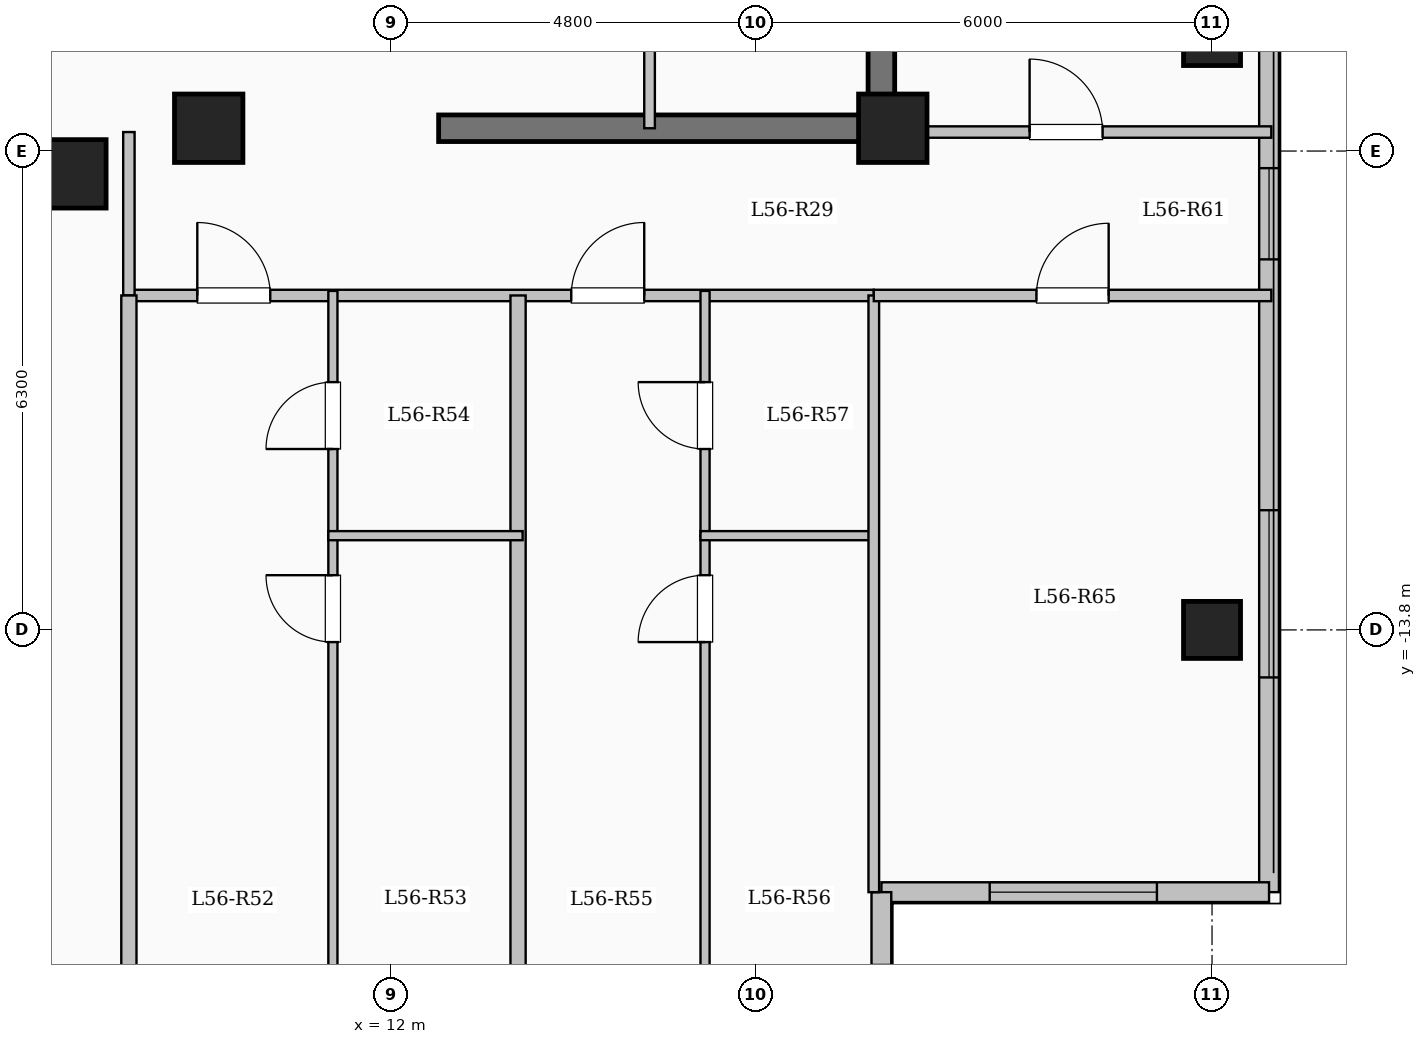
"""IFC4 building model, lengths in metres.
Left out: names, types, materials, properties, quantities, classifications, styles, units other than length and angle.
Written with IfcOpenShell. Run it as: python <this file> out.ifc"""

import sys

from ifc_helpers import new_model, si_unit, direction, frame, frame_2d, origin, origin_2d, place, context, subcontext, project, spatial, rectangle, extrude, element, fill, save


model = new_model("IFC4")
c1 = context("Model", 3, precision=1e-05, world=origin(), true_north=direction((0.0, 1.0)))
c2 = subcontext(c1, "Body", "Model", "MODEL_VIEW")
j1 = project(units=[si_unit("LENGTHUNIT", "METRE"), si_unit("PLANEANGLEUNIT", "RADIAN")], contexts=[c1])
p1 = place(None, origin())
s1 = spatial("IfcSite", under=j1, at=p1, CompositionType="ELEMENT")
p2 = place(p1, origin())
s2 = spatial("IfcBuilding", under=s1, at=p2, CompositionType="ELEMENT")
p3 = place(p2, frame((0.0, 0.0, 207.0)))
s3 = spatial("IfcBuildingStorey", under=s2, at=p3, CompositionType="ELEMENT", Elevation=207.0)
for number, where, z_axis, x_axis in (
    (1, (7.8, -7.8, 0.0), (0.0, 0.0, 1.0), (1.0, 0.0, 0.0)),
    (2, (9.6, -7.2, 0.0), (0.0, 0.0, 1.0), (1.0, 0.0, 0.0)),
    (3, (18.6, -7.2, 0.0), (0.0, 0.0, 1.0), (1.0, 0.0, 0.0)),
):
    element("IfcColumn", number, at=place(p3, frame(where, z_axis=z_axis, x_axis=x_axis)), inside=s3, PredefinedType="COLUMN", context=c2, shape_type="SweptSolid", body=[
        extrude(rectangle(XDim=0.9, YDim=0.9, at=origin_2d()), origin(), (0.0, 0.0, 1.0), 3.35),
    ])
for number, where, z_axis, x_axis in (
    (4, (22.8, -13.8, 0.0), (0.0, 0.0, 1.0), (1.0, 0.0, 0.0)),
    (5, (22.8, -6.0, 0.0), (0.0, 0.0, 1.0), (1.0, 0.0, 0.0)),
):
    element("IfcColumn", number, at=place(p3, frame(where, z_axis=z_axis, x_axis=x_axis)), inside=s3, PredefinedType="COLUMN", context=c2, shape_type="SweptSolid", body=[
        extrude(rectangle(XDim=0.75, YDim=0.75, at=origin_2d()), origin(), (0.0, 0.0, 1.0), 3.35),
    ])
p4 = place(p3, frame((23.55, 17.25, 0.0), z_axis=(0.0, 0.0, 1.0), x_axis=(0.0, -1.0, 0.0)))
e6 = element("IfcWall", 6, at=p4, inside=s3, PredefinedType="SOLIDWALL", context=c2, shape_type="SweptSolid", body=[
    extrude(rectangle(XDim=34.5, YDim=0.26, at=frame_2d((17.25, 0.0))), origin(), (0.0, 0.0, 1.0), 3.1),
])
p5 = place(p4, frame((1.375, 0.0, 0.9)))
e7 = element("IfcOpeningElement", 7, at=p5, cuts=e6, PredefinedType="OPENING", context=c2, shape_type="SweptSolid", body=[
    extrude(rectangle(XDim=2.0, YDim=1.7, at=frame_2d((1.0, 0.85))), frame((0.0, 0.14, 0.0), z_axis=(0.0, -1.0, 0.0), x_axis=(1.0, 0.0, 0.0)), (0.0, 0.0, 1.0), 0.28),
])
p6 = place(p4, frame((5.125, 0.0, 0.95)))
e8 = element("IfcOpeningElement", 8, at=p6, cuts=e6, PredefinedType="OPENING", context=c2, shape_type="SweptSolid", body=[
    extrude(rectangle(XDim=1.0, YDim=1.5, at=frame_2d((0.5, 0.75))), frame((0.0, 0.14, 0.0), z_axis=(0.0, -1.0, 0.0), x_axis=(1.0, 0.0, 0.0)), (0.0, 0.0, 1.0), 0.28),
])
p7 = place(p4, frame((8.375, 0.0, 0.9)))
e9 = element("IfcOpeningElement", 9, at=p7, cuts=e6, PredefinedType="OPENING", context=c2, shape_type="SweptSolid", body=[
    extrude(rectangle(XDim=2.0, YDim=1.7, at=frame_2d((1.0, 0.85))), frame((0.0, 0.14, 0.0), z_axis=(0.0, -1.0, 0.0), x_axis=(1.0, 0.0, 0.0)), (0.0, 0.0, 1.0), 0.28),
])
p8 = place(p4, frame((13.2, 0.0, 0.9)))
e10 = element("IfcOpeningElement", 10, at=p8, cuts=e6, PredefinedType="OPENING", context=c2, shape_type="SweptSolid", body=[
    extrude(rectangle(XDim=1.65, YDim=1.6, at=frame_2d((0.825, 0.8))), frame((0.0, 0.14, 0.0), z_axis=(0.0, -1.0, 0.0), x_axis=(1.0, 0.0, 0.0)), (0.0, 0.0, 1.0), 0.28),
])
p9 = place(p4, frame((19.05, 0.0, 0.9)))
e11 = element("IfcOpeningElement", 11, at=p9, cuts=e6, PredefinedType="OPENING", context=c2, shape_type="SweptSolid", body=[
    extrude(rectangle(XDim=2.2, YDim=1.75, at=frame_2d((1.1, 0.875))), frame((0.0, 0.14, 0.0), z_axis=(0.0, -1.0, 0.0), x_axis=(1.0, 0.0, 0.0)), (0.0, 0.0, 1.0), 0.28),
])
p10 = place(p4, frame((24.975, 0.0, 0.95)))
e12 = element("IfcOpeningElement", 12, at=p10, cuts=e6, PredefinedType="OPENING", context=c2, shape_type="SweptSolid", body=[
    extrude(rectangle(XDim=1.2, YDim=1.5, at=frame_2d((0.6, 0.75))), frame((0.0, 0.14, 0.0), z_axis=(0.0, -1.0, 0.0), x_axis=(1.0, 0.0, 0.0)), (0.0, 0.0, 1.0), 0.28),
])
p11 = place(p4, frame((29.475, 0.0, 0.9)))
e13 = element("IfcOpeningElement", 13, at=p11, cuts=e6, PredefinedType="OPENING", context=c2, shape_type="SweptSolid", body=[
    extrude(rectangle(XDim=2.2, YDim=1.75, at=frame_2d((1.1, 0.875))), frame((0.0, 0.14, 0.0), z_axis=(0.0, -1.0, 0.0), x_axis=(1.0, 0.0, 0.0)), (0.0, 0.0, 1.0), 0.28),
])
p12 = place(p3, frame((23.55, -17.25, 0.0), z_axis=(0.0, 0.0, 1.0), x_axis=(-1.0, 0.0, 0.0)))
e14 = element("IfcWall", 14, at=p12, inside=s3, PredefinedType="SOLIDWALL", context=c2, shape_type="SweptSolid", body=[
    extrude(rectangle(XDim=5.1, YDim=0.26, at=frame_2d((2.55, 0.0))), origin(), (0.0, 0.0, 1.0), 3.1),
])
p13 = place(p12, frame((1.475, 0.0, 0.9)))
e15 = element("IfcOpeningElement", 15, at=p13, cuts=e14, PredefinedType="OPENING", context=c2, shape_type="SweptSolid", body=[
    extrude(rectangle(XDim=2.2, YDim=1.75, at=frame_2d((1.1, 0.875))), frame((0.0, 0.14, 0.0), z_axis=(0.0, -1.0, 0.0), x_axis=(1.0, 0.0, 0.0)), (0.0, 0.0, 1.0), 0.28),
])
p14 = place(p3, frame((18.45, -17.25, 0.0), z_axis=(0.0, 0.0, 1.0), x_axis=(0.0, -1.0, 0.0)))
e16 = element("IfcWall", 16, at=p14, inside=s3, PredefinedType="SOLIDWALL", context=c2, shape_type="SweptSolid", body=[
    extrude(rectangle(XDim=3.6, YDim=0.26, at=frame_2d((1.8, 0.0))), origin(), (0.0, 0.0, 1.0), 3.1),
])
p15 = place(p14, frame((0.958, 0.0, 0.9)))
e17 = element("IfcOpeningElement", 17, at=p15, cuts=e16, PredefinedType="OPENING", context=c2, shape_type="SweptSolid", body=[
    extrude(rectangle(XDim=1.65, YDim=1.6, at=frame_2d((0.825, 0.8))), frame((0.0, 0.14, 0.0), z_axis=(0.0, -1.0, 0.0), x_axis=(1.0, 0.0, 0.0)), (0.0, 0.0, 1.0), 0.28),
])
p16 = place(p3, frame((18.45, -7.375, 0.0), z_axis=(0.0, 0.0, 1.0), x_axis=(0.0, 1.0, 0.0)))
e18 = element("IfcWall", 18, at=p16, inside=s3, PredefinedType="SHEAR", context=c2, shape_type="SweptSolid", body=[
    extrude(rectangle(XDim=14.05, YDim=0.35, at=frame_2d((7.025, 0.0))), origin(), (0.0, 0.0, 1.0), 3.35),
])
p17 = place(p3, frame((12.625, -7.2, 0.0), z_axis=(0.0, 0.0, 1.0), x_axis=(1.0, 0.0, 0.0)))
e19 = element("IfcWall", 19, at=p17, inside=s3, PredefinedType="SHEAR", context=c2, shape_type="SweptSolid", body=[
    extrude(rectangle(XDim=6.0, YDim=0.35, at=frame_2d((3.0, 0.0))), origin(), (0.0, 0.0, 1.0), 3.35),
])
p18 = place(p3, frame((15.4, -7.2, 0.0), z_axis=(0.0, 0.0, 1.0), x_axis=(0.0, 1.0, 0.0)))
e20 = element("IfcWall", 20, at=p18, inside=s3, PredefinedType="PARTITIONING", context=c2, shape_type="SweptSolid", body=[
    extrude(rectangle(XDim=10.45, YDim=0.14, at=frame_2d((5.225, 0.0))), origin(), (0.0, 0.0, 1.0), 3.1),
])
p19 = place(p18, frame((9.25, 0.0, 0.0)))
e21 = element("IfcOpeningElement", 21, at=p19, cuts=e20, PredefinedType="OPENING", context=c2, shape_type="SweptSolid", body=[
    extrude(rectangle(XDim=0.9, YDim=2.08, at=frame_2d((0.45, 1.04))), frame((0.0, 0.08, 0.0), z_axis=(0.0, -1.0, 0.0), x_axis=(1.0, 0.0, 0.0)), (0.0, 0.0, 1.0), 0.16),
])
p20 = place(p3, frame((8.55, -9.4, 0.0), z_axis=(0.0, 0.0, 1.0), x_axis=(1.0, 0.0, 0.0)))
e22 = element("IfcWall", 22, at=p20, inside=s3, PredefinedType="PARTITIONING", context=c2, shape_type="SweptSolid", body=[
    extrude(rectangle(XDim=9.8, YDim=0.15, at=frame_2d((4.9, 0.0))), origin(), (0.0, 0.0, 1.0), 3.1),
])
p21 = place(p20, frame((0.9, 0.0, 0.0)))
e23 = element("IfcOpeningElement", 23, at=p21, cuts=e22, PredefinedType="OPENING", context=c2, shape_type="SweptSolid", body=[
    extrude(rectangle(XDim=0.96, YDim=2.15, at=frame_2d((0.48, 1.075))), frame((0.0, 0.085, 0.0), z_axis=(0.0, -1.0, 0.0), x_axis=(1.0, 0.0, 0.0)), (0.0, 0.0, 1.0), 0.17),
])
p22 = place(p20, frame((5.82, 0.0, 0.0)))
e24 = element("IfcOpeningElement", 24, at=p22, cuts=e22, PredefinedType="OPENING", context=c2, shape_type="SweptSolid", body=[
    extrude(rectangle(XDim=0.96, YDim=2.15, at=frame_2d((0.48, 1.075))), frame((0.0, 0.085, 0.0), z_axis=(0.0, -1.0, 0.0), x_axis=(1.0, 0.0, 0.0)), (0.0, 0.0, 1.0), 0.17),
])
p23 = place(p3, frame((8.55, -9.4, 0.0), z_axis=(0.0, 0.0, 1.0), x_axis=(0.0, 1.0, 0.0)))
e25 = element("IfcWall", 25, at=p23, inside=s3, PredefinedType="PARTITIONING", context=c2, shape_type="SweptSolid", body=[
    extrude(rectangle(XDim=2.15, YDim=0.15, at=frame_2d((1.075, 0.0))), origin(), (0.0, 0.0, 1.0), 3.1),
])
p24 = place(p3, frame((13.67, -20.9, 0.0), z_axis=(0.0, 0.0, 1.0), x_axis=(0.0, 1.0, 0.0)))
e26 = element("IfcWall", 26, at=p24, inside=s3, PredefinedType="SOLIDWALL", context=c2, shape_type="SweptSolid", body=[
    extrude(rectangle(XDim=11.5, YDim=0.2, at=frame_2d((5.75, 0.0))), origin(), (0.0, 0.0, 1.0), 3.1),
])
p25 = place(p3, frame((11.234, -20.9, 0.0), z_axis=(0.0, 0.0, 1.0), x_axis=(0.0, 1.0, 0.0)))
e27 = element("IfcWall", 27, at=p25, inside=s3, PredefinedType="PARTITIONING", context=c2, shape_type="SweptSolid", body=[
    extrude(rectangle(XDim=8.34, YDim=0.12, at=frame_2d((4.17, 0.0))), origin(), (0.0, 0.0, 1.0), 3.1),
])
p26 = place(p25, frame((6.94, 0.0, 0.0)))
e28 = element("IfcOpeningElement", 28, at=p26, cuts=e27, PredefinedType="OPENING", context=c2, shape_type="SweptSolid", body=[
    extrude(rectangle(XDim=0.88, YDim=2.1, at=frame_2d((0.44, 1.05))), frame((0.0, 0.07, 0.0), z_axis=(0.0, -1.0, 0.0), x_axis=(1.0, 0.0, 0.0)), (0.0, 0.0, 1.0), 0.14),
])
p27 = place(p3, frame((11.234, -12.56, 0.0), z_axis=(0.0, 0.0, 1.0), x_axis=(0.0, 1.0, 0.0)))
e29 = element("IfcWall", 29, at=p27, inside=s3, PredefinedType="PARTITIONING", context=c2, shape_type="SweptSolid", body=[
    extrude(rectangle(XDim=3.22, YDim=0.12, at=frame_2d((1.61, 0.0))), origin(), (0.0, 0.0, 1.0), 3.1),
])
p28 = place(p27, frame((1.14, 0.0, 0.0)))
e30 = element("IfcOpeningElement", 30, at=p28, cuts=e29, PredefinedType="OPENING", context=c2, shape_type="SweptSolid", body=[
    extrude(rectangle(XDim=0.88, YDim=2.1, at=frame_2d((0.44, 1.05))), frame((0.0, 0.07, 0.0), z_axis=(0.0, -1.0, 0.0), x_axis=(1.0, 0.0, 0.0)), (0.0, 0.0, 1.0), 0.14),
])
p29 = place(p3, frame((11.174, -12.56, 0.0), z_axis=(0.0, 0.0, 1.0), x_axis=(1.0, 0.0, 0.0)))
e31 = element("IfcWall", 31, at=p29, inside=s3, PredefinedType="PARTITIONING", context=c2, shape_type="SweptSolid", body=[
    extrude(rectangle(XDim=2.556, YDim=0.12, at=frame_2d((1.278, 0.0))), origin(), (0.0, 0.0, 1.0), 2.725),
])
p30 = place(p3, frame((16.13, -20.9, 0.0), z_axis=(0.0, 0.0, 1.0), x_axis=(0.0, 1.0, 0.0)))
e32 = element("IfcWall", 32, at=p30, inside=s3, PredefinedType="PARTITIONING", context=c2, shape_type="SweptSolid", body=[
    extrude(rectangle(XDim=8.34, YDim=0.12, at=frame_2d((4.17, 0.0))), origin(), (0.0, 0.0, 1.0), 3.1),
])
p31 = place(p30, frame((6.94, 0.0, 0.0)))
e33 = element("IfcOpeningElement", 33, at=p31, cuts=e32, PredefinedType="OPENING", context=c2, shape_type="SweptSolid", body=[
    extrude(rectangle(XDim=0.88, YDim=2.1, at=frame_2d((0.44, 1.05))), frame((0.0, 0.07, 0.0), z_axis=(0.0, -1.0, 0.0), x_axis=(1.0, 0.0, 0.0)), (0.0, 0.0, 1.0), 0.14),
])
p32 = place(p3, frame((16.13, -12.56, 0.0), z_axis=(0.0, 0.0, 1.0), x_axis=(0.0, 1.0, 0.0)))
e34 = element("IfcWall", 34, at=p32, inside=s3, PredefinedType="PARTITIONING", context=c2, shape_type="SweptSolid", body=[
    extrude(rectangle(XDim=3.22, YDim=0.12, at=frame_2d((1.61, 0.0))), origin(), (0.0, 0.0, 1.0), 3.1),
])
p33 = place(p32, frame((1.14, 0.0, 0.0)))
e35 = element("IfcOpeningElement", 35, at=p33, cuts=e34, PredefinedType="OPENING", context=c2, shape_type="SweptSolid", body=[
    extrude(rectangle(XDim=0.88, YDim=2.1, at=frame_2d((0.44, 1.05))), frame((0.0, 0.07, 0.0), z_axis=(0.0, -1.0, 0.0), x_axis=(1.0, 0.0, 0.0)), (0.0, 0.0, 1.0), 0.14),
])
p34 = place(p3, frame((16.07, -12.56, 0.0), z_axis=(0.0, 0.0, 1.0), x_axis=(1.0, 0.0, 0.0)))
e36 = element("IfcWall", 36, at=p34, inside=s3, PredefinedType="PARTITIONING", context=c2, shape_type="SweptSolid", body=[
    extrude(rectangle(XDim=2.34, YDim=0.12, at=frame_2d((1.17, 0.0))), origin(), (0.0, 0.0, 1.0), 3.1),
])
p35 = place(p3, frame((8.55, -21.504, 0.0), z_axis=(0.0, 0.0, 1.0), x_axis=(0.0, 1.0, 0.0)))
e37 = element("IfcWall", 37, at=p35, inside=s3, PredefinedType="SOLIDWALL", context=c2, shape_type="SweptSolid", body=[
    extrude(rectangle(XDim=12.104, YDim=0.2, at=frame_2d((6.052, 0.0))), origin(), (0.0, 0.0, 1.0), 3.1),
])
p36 = place(p3, frame((18.45, -7.25, 0.0), z_axis=(0.0, 0.0, 1.0), x_axis=(1.0, 0.0, 0.0)))
e38 = element("IfcWall", 38, at=p36, inside=s3, PredefinedType="PARTITIONING", context=c2, shape_type="SweptSolid", body=[
    extrude(rectangle(XDim=5.13, YDim=0.15, at=frame_2d((2.565, 0.0))), origin(), (0.0, 0.0, 1.0), 3.1),
])
p37 = place(p36, frame((1.95, 0.0, 0.0)))
e39 = element("IfcOpeningElement", 39, at=p37, cuts=e38, PredefinedType="OPENING", context=c2, shape_type="SweptSolid", body=[
    extrude(rectangle(XDim=0.96, YDim=2.15, at=frame_2d((0.48, 1.075))), frame((0.0, 0.085, 0.0), z_axis=(0.0, -1.0, 0.0), x_axis=(1.0, 0.0, 0.0)), (0.0, 0.0, 1.0), 0.17),
])
p38 = place(p3, frame((18.35, -17.25, 0.0), z_axis=(0.0, 0.0, 1.0), x_axis=(0.0, 1.0, 0.0)))
e40 = element("IfcWall", 40, at=p38, inside=s3, PredefinedType="PARTITIONING", context=c2, shape_type="SweptSolid", body=[
    extrude(rectangle(XDim=7.85, YDim=0.14, at=frame_2d((3.925, 0.0))), origin(), (0.0, 0.0, 1.0), 3.1),
])
p39 = place(p3, frame((18.35, -9.4, 0.0), z_axis=(0.0, 0.0, 1.0), x_axis=(1.0, 0.0, 0.0)))
e41 = element("IfcWall", 41, at=p39, inside=s3, PredefinedType="PARTITIONING", context=c2, shape_type="SweptSolid", body=[
    extrude(rectangle(XDim=5.23, YDim=0.15, at=frame_2d((2.615, 0.0))), origin(), (0.0, 0.0, 1.0), 3.1),
])
p40 = place(p39, frame((2.14, 0.0, 0.0)))
e42 = element("IfcOpeningElement", 42, at=p40, cuts=e41, PredefinedType="OPENING", context=c2, shape_type="SweptSolid", body=[
    extrude(rectangle(XDim=0.95, YDim=2.15, at=frame_2d((0.475, 1.075))), frame((0.0, 0.085, 0.0), z_axis=(0.0, -1.0, 0.0), x_axis=(1.0, 0.0, 0.0)), (0.0, 0.0, 1.0), 0.17),
])
p41 = place(p10, origin())
e43 = element("IfcWindow", 43, at=p41, inside=s3, PartitioningType="SINGLE_PANEL", PredefinedType="WINDOW", context=c2, shape_type="SweptSolid", body=[
    extrude(rectangle(XDim=1.2, YDim=1.5, at=frame_2d((0.6, 0.75))), frame((0.0, 0.03, 0.0), z_axis=(0.0, -1.0, 0.0), x_axis=(1.0, 0.0, 0.0)), (0.0, 0.0, 1.0), 0.06),
])
fill(e12, e43)
p42 = place(p11, origin())
e44 = element("IfcWindow", 44, at=p42, inside=s3, PartitioningType="SINGLE_PANEL", PredefinedType="WINDOW", context=c2, shape_type="SweptSolid", body=[
    extrude(rectangle(XDim=2.2, YDim=1.75, at=frame_2d((1.1, 0.875))), frame((0.0, 0.03, 0.0), z_axis=(0.0, -1.0, 0.0), x_axis=(1.0, 0.0, 0.0)), (0.0, 0.0, 1.0), 0.06),
])
fill(e13, e44)
p43 = place(p13, origin())
e45 = element("IfcWindow", 45, at=p43, inside=s3, PartitioningType="SINGLE_PANEL", PredefinedType="WINDOW", context=c2, shape_type="SweptSolid", body=[
    extrude(rectangle(XDim=2.2, YDim=1.75, at=frame_2d((1.1, 0.875))), frame((0.0, 0.03, 0.0), z_axis=(0.0, -1.0, 0.0), x_axis=(1.0, 0.0, 0.0)), (0.0, 0.0, 1.0), 0.06),
])
fill(e15, e45)
p44 = place(p21, origin())
e46 = element("IfcDoor", 46, at=p44, inside=s3, OperationType="SINGLE_SWING_LEFT", PredefinedType="DOOR", context=c2, shape_type="SweptSolid", body=[
    extrude(rectangle(XDim=0.96, YDim=2.15, at=frame_2d((0.48, 1.075))), frame((0.0, 0.025, 0.0), z_axis=(0.0, -1.0, 0.0), x_axis=(1.0, 0.0, 0.0)), (0.0, 0.0, 1.0), 0.05),
])
fill(e23, e46)
p45 = place(p26, origin())
e47 = element("IfcDoor", 47, at=p45, inside=s3, OperationType="SINGLE_SWING_RIGHT", PredefinedType="DOOR", context=c2, shape_type="SweptSolid", body=[
    extrude(rectangle(XDim=0.88, YDim=2.1, at=frame_2d((0.44, 1.05))), frame((0.0, 0.025, 0.0), z_axis=(0.0, -1.0, 0.0), x_axis=(1.0, 0.0, 0.0)), (0.0, 0.0, 1.0), 0.05),
])
fill(e28, e47)
p46 = place(p28, origin())
e48 = element("IfcDoor", 48, at=p46, inside=s3, OperationType="SINGLE_SWING_LEFT", PredefinedType="DOOR", context=c2, shape_type="SweptSolid", body=[
    extrude(rectangle(XDim=0.88, YDim=2.1, at=frame_2d((0.44, 1.05))), frame((0.0, 0.025, 0.0), z_axis=(0.0, -1.0, 0.0), x_axis=(1.0, 0.0, 0.0)), (0.0, 0.0, 1.0), 0.05),
])
fill(e30, e48)
p47 = place(p22, origin())
e49 = element("IfcDoor", 49, at=p47, inside=s3, OperationType="SINGLE_SWING_RIGHT", PredefinedType="DOOR", context=c2, shape_type="SweptSolid", body=[
    extrude(rectangle(XDim=0.96, YDim=2.15, at=frame_2d((0.48, 1.075))), frame((0.0, 0.025, 0.0), z_axis=(0.0, -1.0, 0.0), x_axis=(1.0, 0.0, 0.0)), (0.0, 0.0, 1.0), 0.05),
])
fill(e24, e49)
p48 = place(p31, origin())
e50 = element("IfcDoor", 50, at=p48, inside=s3, OperationType="SINGLE_SWING_LEFT", PredefinedType="DOOR", context=c2, shape_type="SweptSolid", body=[
    extrude(rectangle(XDim=0.88, YDim=2.1, at=frame_2d((0.44, 1.05))), frame((0.0, 0.025, 0.0), z_axis=(0.0, -1.0, 0.0), x_axis=(1.0, 0.0, 0.0)), (0.0, 0.0, 1.0), 0.05),
])
fill(e33, e50)
p49 = place(p33, origin())
e51 = element("IfcDoor", 51, at=p49, inside=s3, OperationType="SINGLE_SWING_RIGHT", PredefinedType="DOOR", context=c2, shape_type="SweptSolid", body=[
    extrude(rectangle(XDim=0.88, YDim=2.1, at=frame_2d((0.44, 1.05))), frame((0.0, 0.025, 0.0), z_axis=(0.0, -1.0, 0.0), x_axis=(1.0, 0.0, 0.0)), (0.0, 0.0, 1.0), 0.05),
])
fill(e35, e51)
p50 = place(p40, origin())
e52 = element("IfcDoor", 52, at=p50, inside=s3, OperationType="SINGLE_SWING_RIGHT", PredefinedType="DOOR", context=c2, shape_type="SweptSolid", body=[
    extrude(rectangle(XDim=0.95, YDim=2.15, at=frame_2d((0.475, 1.075))), frame((0.0, 0.025, 0.0), z_axis=(0.0, -1.0, 0.0), x_axis=(1.0, 0.0, 0.0)), (0.0, 0.0, 1.0), 0.05),
])
fill(e42, e52)
p51 = place(p37, origin())
e53 = element("IfcDoor", 53, at=p51, inside=s3, OperationType="SINGLE_SWING_LEFT", PredefinedType="DOOR", context=c2, shape_type="SweptSolid", body=[
    extrude(rectangle(XDim=0.96, YDim=2.15, at=frame_2d((0.48, 1.075))), frame((0.0, 0.025, 0.0), z_axis=(0.0, -1.0, 0.0), x_axis=(1.0, 0.0, 0.0)), (0.0, 0.0, 1.0), 0.05),
])
fill(e39, e53)
save(model, sys.argv[1])
